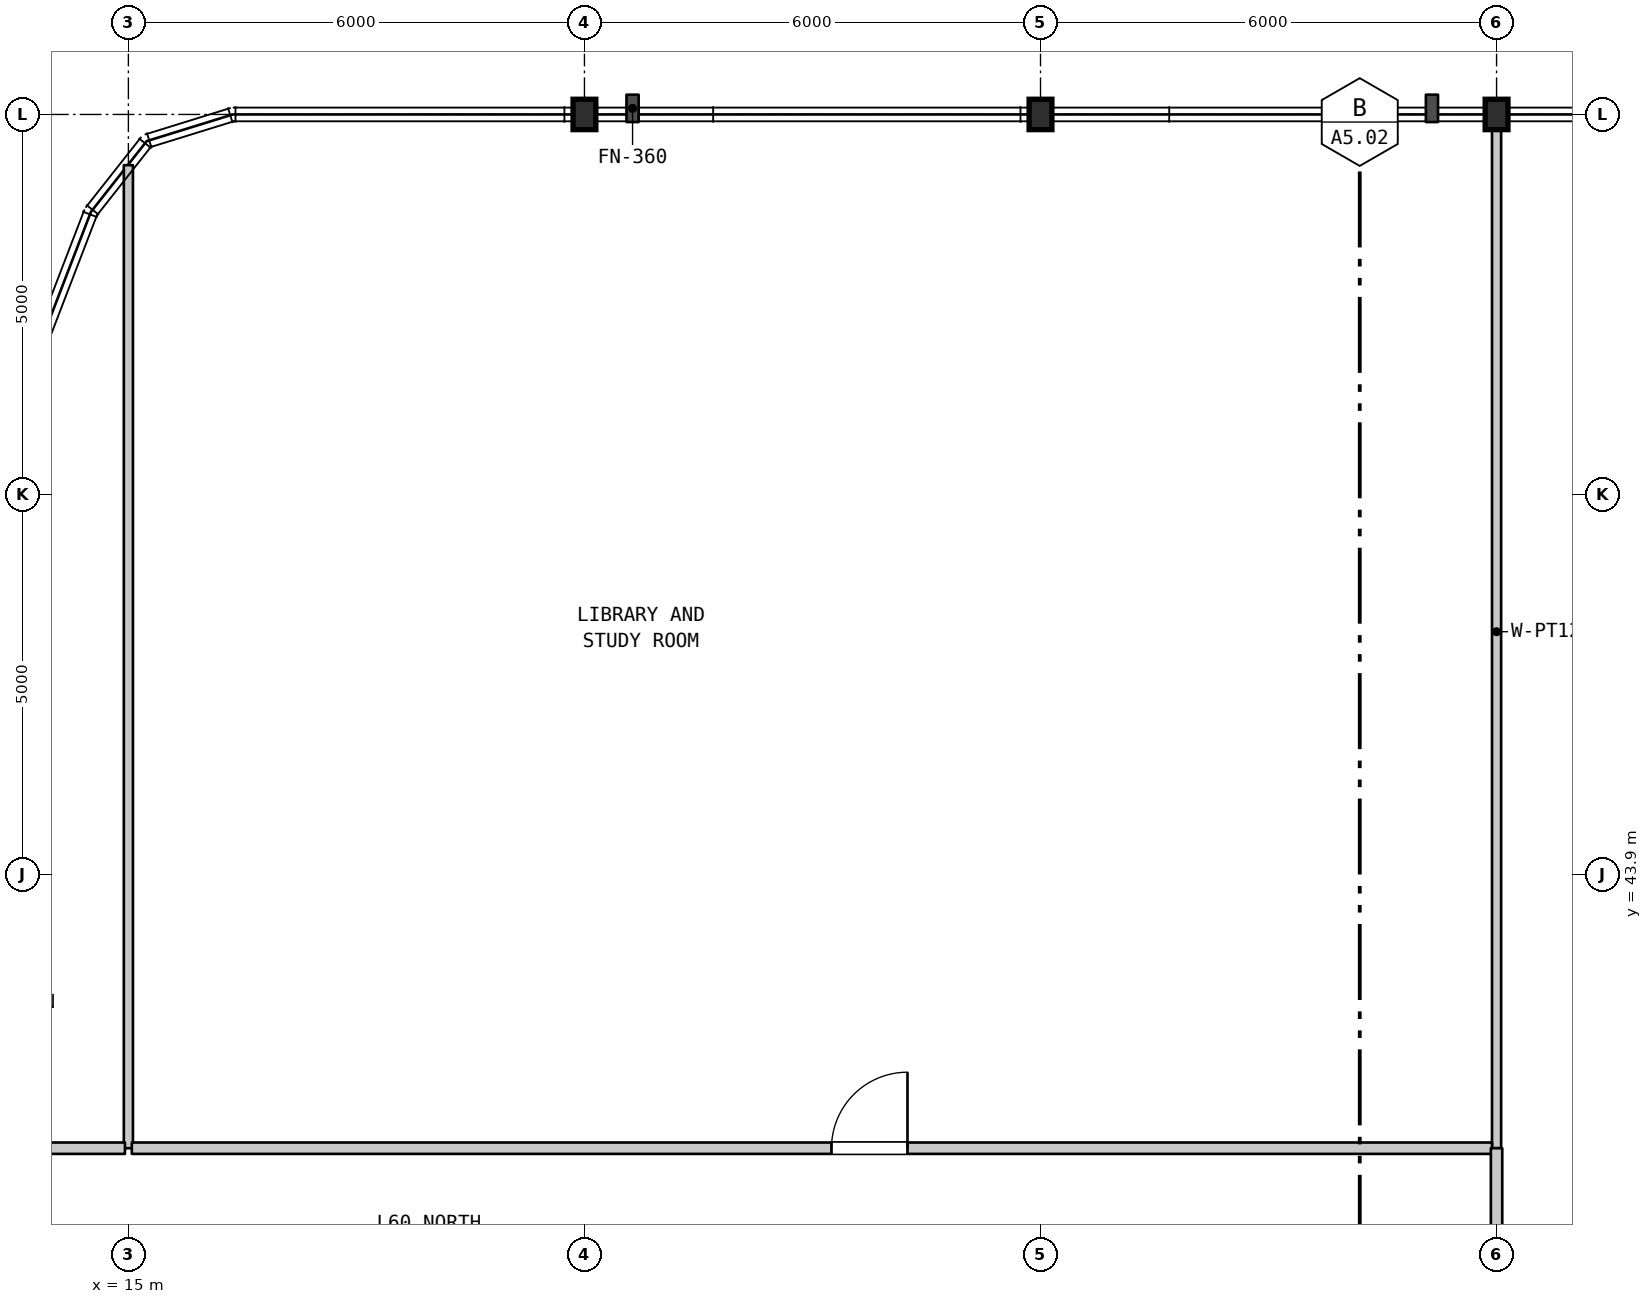
"""IFC4 building model, lengths in metres.
Left out: names, types, materials, properties, quantities, classifications, styles, units other than length and angle.
Written with IfcOpenShell. Run it as: python <this file> out.ifc"""

import sys

from ifc_helpers import new_model, si_unit, direction, frame, frame_2d, origin, origin_2d, place, context, subcontext, project, spatial, rectangle, i_section, extrude, element, fill, save


model = new_model("IFC4")
c1 = context("Model", 3, precision=1e-05, world=origin(), true_north=direction((0.0, 1.0)))
c2 = subcontext(c1, "Body", "Model", "MODEL_VIEW")
j1 = project(units=[si_unit("LENGTHUNIT", "METRE"), si_unit("PLANEANGLEUNIT", "RADIAN")], contexts=[c1])
p1 = place(None, origin())
s1 = spatial("IfcSite", under=j1, at=p1, CompositionType="ELEMENT")
p2 = place(p1, origin())
s2 = spatial("IfcBuilding", under=s1, at=p2, CompositionType="ELEMENT")
p3 = place(p2, frame((0.0, 0.0, 242.8)))
s3 = spatial("IfcBuildingStorey", under=s2, at=p3, CompositionType="ELEMENT", Elevation=242.8)
for number, where, z_axis, x_axis in (
    (1, (21.0, 53.9, 0.0), (0.0, 0.0, 1.0), (1.0, 0.0, 0.0)),
    (2, (27.0, 53.9, 0.0), (0.0, 0.0, 1.0), (1.0, 0.0, 0.0)),
    (3, (33.0, 53.9, 0.0), (0.0, 0.0, 1.0), (1.0, 0.0, 0.0)),
):
    element("IfcColumn", number, at=place(p3, frame(where, z_axis=z_axis, x_axis=x_axis)), inside=s3, PredefinedType="COLUMN", context=c2, shape_type="SweptSolid", body=[
        extrude(i_section(OverallWidth=0.3, OverallDepth=0.4, WebThickness=0.013, FlangeThickness=0.024, FilletRadius=0.027, at=origin_2d()), origin(), (0.0, 0.0, 1.0), 4.5),
    ])
p4 = place(p3, frame((15.0, 40.3, 0.0), z_axis=(0.0, 0.0, 1.0), x_axis=(0.0, 1.0, 0.0)))
e4 = element("IfcWall", 4, at=p4, inside=s3, PredefinedType="PARTITIONING", context=c2, shape_type="SweptSolid", body=[
    extrude(rectangle(XDim=12.933, YDim=0.12, at=frame_2d((6.466, 0.0))), origin(), (0.0, 0.0, 1.0), 4.19),
])
p5 = place(p3, frame((33.0, 40.3, 0.0), z_axis=(0.0, 0.0, 1.0), x_axis=(0.0, 1.0, 0.0)))
e5 = element("IfcWall", 5, at=p5, inside=s3, PredefinedType="PARTITIONING", context=c2, shape_type="SweptSolid", body=[
    extrude(rectangle(XDim=13.59, YDim=0.12, at=frame_2d((6.795, 0.0))), origin(), (0.0, 0.0, 1.0), 3.59),
])
p6 = place(p3, frame((12.66, 40.3, 0.0), z_axis=(0.0, 0.0, 1.0), x_axis=(1.0, 0.0, 0.0)))
e6 = element("IfcWall", 6, at=p6, inside=s3, PredefinedType="STANDARD", context=c2, shape_type="SweptSolid", body=[
    extrude(rectangle(XDim=2.295, YDim=0.15, at=frame_2d((1.147, 0.0))), origin(), (0.0, 0.0, 1.0), 4.19),
])
p7 = place(p3, frame((15.045, 40.3, 0.0), z_axis=(0.0, 0.0, 1.0), x_axis=(1.0, 0.0, 0.0)))
e7 = element("IfcWall", 7, at=p7, inside=s3, PredefinedType="STANDARD", context=c2, shape_type="SweptSolid", body=[
    extrude(rectangle(XDim=17.895, YDim=0.15, at=frame_2d((8.948, 0.0))), origin(), (0.0, 0.0, 1.0), 4.19),
])
p8 = place(p7, frame((9.205, 0.0, 0.0)))
e8 = element("IfcOpeningElement", 8, at=p8, cuts=e7, PredefinedType="OPENING", context=c2, shape_type="SweptSolid", body=[
    extrude(rectangle(XDim=1.0, YDim=2.15, at=frame_2d((0.5, 1.075))), frame((0.0, 0.085, 0.0), z_axis=(0.0, -1.0, 0.0), x_axis=(1.0, 0.0, 0.0)), (0.0, 0.0, 1.0), 0.17),
])
p9 = place(p3, frame((33.0, 37.9, 0.0), z_axis=(0.0, 0.0, 1.0), x_axis=(0.0, 1.0, 0.0)))
e9 = element("IfcWall", 9, at=p9, inside=s3, PredefinedType="STANDARD", context=c2, shape_type="SweptSolid", body=[
    extrude(rectangle(XDim=2.4, YDim=0.15, at=frame_2d((1.2, 0.0))), origin(), (0.0, 0.0, 1.0), 3.59),
])
p10 = place(p8, origin())
e10 = element("IfcDoor", 10, at=p10, inside=s3, OperationType="SINGLE_SWING_RIGHT", PredefinedType="DOOR", context=c2, shape_type="SweptSolid", body=[
    extrude(rectangle(XDim=1.0, YDim=2.15, at=frame_2d((0.5, 1.075))), frame((0.0, 0.025, 0.0), z_axis=(0.0, -1.0, 0.0), x_axis=(1.0, 0.0, 0.0)), (0.0, 0.0, 1.0), 0.05),
])
fill(e8, e10)
save(model, sys.argv[1])
